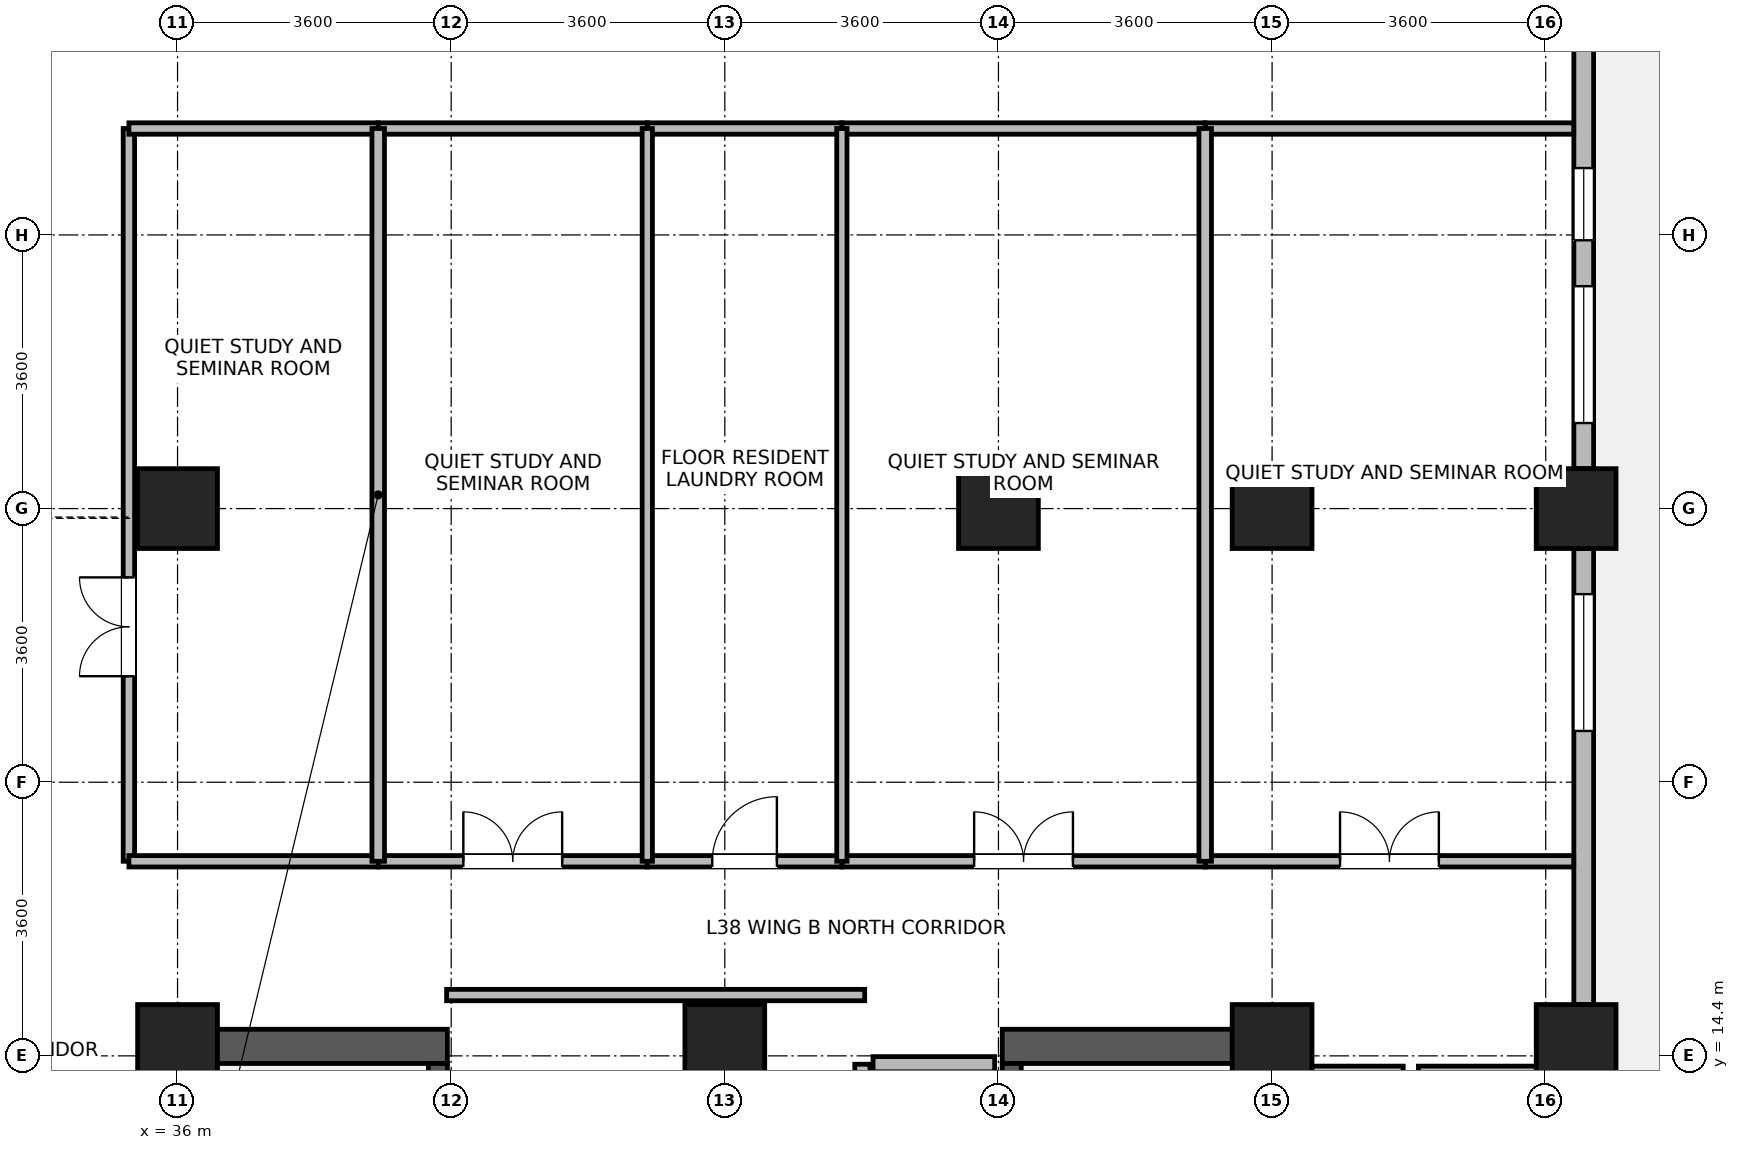
"""IFC4 building model, lengths in metres.
Left out: names, types, materials, properties, quantities, classifications, styles, units other than length and angle.
Written with IfcOpenShell. Run it as: python <this file> out.ifc"""

import sys

from ifc_helpers import new_model, si_unit, direction, frame, frame_2d, origin, origin_2d, place, context, subcontext, project, spatial, rectangle, extrude, source, transform, mapped, element, fill, save


model = new_model("IFC4")
c1 = context("Model", 3, precision=1e-05, world=origin(), true_north=direction((0.0, 1.0)))
c2 = subcontext(c1, "Body", "Model", "MODEL_VIEW")
j1 = project(units=[si_unit("LENGTHUNIT", "METRE"), si_unit("PLANEANGLEUNIT", "RADIAN")], contexts=[c1])
p1 = place(None, origin())
s1 = spatial("IfcSite", under=j1, at=p1, CompositionType="ELEMENT")
p2 = place(p1, origin())
s2 = spatial("IfcBuilding", under=s1, at=p2, CompositionType="ELEMENT")
p3 = place(p2, frame((0.0, 0.0, 151.3)))
s3 = spatial("IfcBuildingStorey", under=s2, at=p3, CompositionType="ELEMENT", Elevation=151.3)
for number, where, z_axis, x_axis in (
    (1, (36.125, 6.85, 0.0), (0.0, 0.0, 1.0), (0.0, 1.0, 0.0)),
    (2, (50.275, 6.85, 0.0), (0.0, 0.0, 1.0), (0.0, 1.0, 0.0)),
):
    element("IfcWall", number, at=place(p3, frame(where, z_axis=z_axis, x_axis=x_axis)), inside=s3, PredefinedType="SHEAR", context=c2, shape_type="SweptSolid", body=[
        extrude(rectangle(XDim=7.9, YDim=0.45, at=frame_2d((3.95, 0.0))), origin(), (0.0, 0.0, 1.0), 3.46),
    ])
for number, where, z_axis, x_axis in (
    (3, (36.35, 14.525, 0.0), (0.0, 0.0, 1.0), (1.0, 0.0, 0.0)),
    (4, (46.85, 14.525, 0.0), (0.0, 0.0, 1.0), (1.0, 0.0, 0.0)),
):
    element("IfcWall", number, at=place(p3, frame(where, z_axis=z_axis, x_axis=x_axis)), inside=s3, PredefinedType="SHEAR", context=c2, shape_type="SweptSolid", body=[
        extrude(rectangle(XDim=3.2, YDim=0.45, at=frame_2d((1.6, 0.0))), origin(), (0.0, 0.0, 1.0), 3.46),
    ])
p4 = place(p3, frame((39.425, 7.3, 0.0), z_axis=(0.0, 0.0, 1.0), x_axis=(0.0, 1.0, 0.0)))
e5 = element("IfcWall", 5, at=p4, inside=s3, PredefinedType="SHEAR", context=c2, shape_type="SweptSolid", body=[
    extrude(rectangle(XDim=7.0, YDim=0.25, at=frame_2d((3.5, 0.0))), origin(), (0.0, 0.0, 1.0), 3.46),
])
p5 = place(p4, frame((0.15, 0.0, 0.0)))
e6 = element("IfcOpeningElement", 6, at=p5, cuts=e5, PredefinedType="OPENING", context=c2, shape_type="SweptSolid", body=[
    extrude(rectangle(XDim=1.1, YDim=2.08, at=frame_2d((0.55, 1.04))), frame((0.0, 0.135, 0.0), z_axis=(0.0, -1.0, 0.0), x_axis=(1.0, 0.0, 0.0)), (0.0, 0.0, 1.0), 0.27),
])
p6 = place(p3, frame((46.975, 7.3, 0.0), z_axis=(0.0, 0.0, 1.0), x_axis=(0.0, 1.0, 0.0)))
e7 = element("IfcWall", 7, at=p6, inside=s3, PredefinedType="SHEAR", context=c2, shape_type="SweptSolid", body=[
    extrude(rectangle(XDim=7.0, YDim=0.25, at=frame_2d((3.5, 0.0))), origin(), (0.0, 0.0, 1.0), 3.46),
])
p7 = place(p6, frame((0.15, 0.0, 0.0)))
e8 = element("IfcOpeningElement", 8, at=p7, cuts=e7, PredefinedType="OPENING", context=c2, shape_type="SweptSolid", body=[
    extrude(rectangle(XDim=1.1, YDim=2.08, at=frame_2d((0.55, 1.04))), frame((0.0, 0.135, 0.0), z_axis=(0.0, -1.0, 0.0), x_axis=(1.0, 0.0, 0.0)), (0.0, 0.0, 1.0), 0.27),
])
m1 = source(origin(), c2, "Body", "SweptSolid", [
    extrude(rectangle(XDim=1.05, YDim=1.05, at=origin_2d()), origin(), (0.0, 0.0, 1.0), 3.7),
])
for number, where, z_axis, x_axis in (
    (9, (36.0, 21.6, 0.0), (0.0, 0.0, 1.0), (1.0, 0.0, 0.0)),
    (10, (46.8, 21.6, 0.0), (0.0, 0.0, 1.0), (1.0, 0.0, 0.0)),
    (11, (36.0, 14.55, 0.0), (0.0, 0.0, 1.0), (1.0, 0.0, 0.0)),
    (12, (43.2, 14.55, 0.0), (0.0, 0.0, 1.0), (1.0, 0.0, 0.0)),
    (13, (50.4, 14.55, 0.0), (0.0, 0.0, 1.0), (1.0, 0.0, 0.0)),
    (14, (50.4, 21.6, 0.0), (0.0, 0.0, 1.0), (1.0, 0.0, 0.0)),
    (15, (54.4, 14.55, 0.0), (0.0, 0.0, 1.0), (1.0, 0.0, 0.0)),
    (16, (54.4, 21.6, 0.0), (0.0, 0.0, 1.0), (1.0, 0.0, 0.0)),
):
    element("IfcColumn", number, at=place(p3, frame(where, z_axis=z_axis, x_axis=x_axis)), inside=s3, PredefinedType="COLUMN", context=c2, shape_type="MappedRepresentation", body=[
        mapped(m1, transform((0.0, 0.0, 0.0), x_axis=(1.0, 0.0, 0.0), y_axis=(0.0, 1.0, 0.0), z_axis=(0.0, 0.0, 1.0), scale=1.0)),
    ])
p8 = place(p3, frame((54.5, 21.074, 0.0), z_axis=(0.0, 0.0, 1.0), x_axis=(0.0, -1.0, 0.0)))
e17 = element("IfcWall", 17, at=p8, inside=s3, PredefinedType="STANDARD", context=c2, shape_type="SweptSolid", body=[
    extrude(rectangle(XDim=5.998, YDim=0.26, at=frame_2d((2.999, 0.0))), origin(), (0.0, 0.0, 1.0), 2.99),
])
p9 = place(p8, frame((0.6, 0.0, 0.85)))
e18 = element("IfcOpeningElement", 18, at=p9, cuts=e17, PredefinedType="OPENING", context=c2, shape_type="SweptSolid", body=[
    extrude(rectangle(XDim=1.8, YDim=1.85, at=frame_2d((0.9, 0.925))), frame((0.0, 0.14, 0.0), z_axis=(0.0, -1.0, 0.0), x_axis=(1.0, 0.0, 0.0)), (0.0, 0.0, 1.0), 0.28),
])
p10 = place(p3, frame((54.5, 28.124, 0.0), z_axis=(0.0, 0.0, 1.0), x_axis=(0.0, -1.0, 0.0)))
e19 = element("IfcWall", 19, at=p10, inside=s3, PredefinedType="STANDARD", context=c2, shape_type="SweptSolid", body=[
    extrude(rectangle(XDim=5.998, YDim=0.26, at=frame_2d((2.999, 0.0))), origin(), (0.0, 0.0, 1.0), 2.99),
])
p11 = place(p10, frame((3.598, 0.0, 0.85)))
e20 = element("IfcOpeningElement", 20, at=p11, cuts=e19, PredefinedType="OPENING", context=c2, shape_type="SweptSolid", body=[
    extrude(rectangle(XDim=1.8, YDim=1.85, at=frame_2d((0.9, 0.925))), frame((0.0, 0.14, 0.0), z_axis=(0.0, -1.0, 0.0), x_axis=(1.0, 0.0, 0.0)), (0.0, 0.0, 1.0), 0.28),
])
p12 = place(p10, frame((2.044, 0.0, 0.85)))
e21 = element("IfcOpeningElement", 21, at=p12, cuts=e19, PredefinedType="OPENING", context=c2, shape_type="SweptSolid", body=[
    extrude(rectangle(XDim=0.95, YDim=1.75, at=frame_2d((0.475, 0.875))), frame((0.0, 0.14, 0.0), z_axis=(0.0, -1.0, 0.0), x_axis=(1.0, 0.0, 0.0)), (0.0, 0.0, 1.0), 0.28),
])
p13 = place(p3, frame((50.475, 14.165, 0.0), z_axis=(0.0, 0.0, 1.0), x_axis=(1.0, 0.0, 0.0)))
e22 = element("IfcWall", 22, at=p13, inside=s3, PredefinedType="PARTITIONING", context=c2, shape_type="SweptSolid", body=[
    extrude(rectangle(XDim=1.65, YDim=0.2, at=frame_2d((0.825, 0.0))), origin(), (0.0, 0.0, 1.0), 3.44),
])
p14 = place(p3, frame((52.325, 14.165, 0.0), z_axis=(0.0, 0.0, 1.0), x_axis=(1.0, 0.0, 0.0)))
e23 = element("IfcWall", 23, at=p14, inside=s3, PredefinedType="PARTITIONING", context=c2, shape_type="SweptSolid", body=[
    extrude(rectangle(XDim=1.65, YDim=0.2, at=frame_2d((0.825, 0.0))), origin(), (0.0, 0.0, 1.0), 3.44),
])
p15 = place(p3, frame((45.15, 14.29, 0.0), z_axis=(0.0, 0.0, 1.0), x_axis=(1.0, 0.0, 0.0)))
e24 = element("IfcWall", 24, at=p15, inside=s3, PredefinedType="PARTITIONING", context=c2, shape_type="SweptSolid", body=[
    extrude(rectangle(XDim=1.6, YDim=0.2, at=frame_2d((0.8, 0.0))), origin(), (0.0, 0.0, 1.0), 2.44),
])
p16 = place(p3, frame((45.01, 11.61, 0.0), z_axis=(0.0, 0.0, 1.0), x_axis=(0.0, 1.0, 0.0)))
e25 = element("IfcWall", 25, at=p16, inside=s3, PredefinedType="PARTITIONING", context=c2, shape_type="SweptSolid", body=[
    extrude(rectangle(XDim=2.68, YDim=0.2, at=frame_2d((1.34, 0.0))), origin(), (0.0, 0.0, 1.0), 3.44),
])
p17 = place(p3, frame((35.36, 16.96, 0.0), z_axis=(0.0, 0.0, 1.0), x_axis=(0.0, 1.0, 0.0)))
e26 = element("IfcWall", 26, at=p17, inside=s3, PredefinedType="PARTITIONING", context=c2, shape_type="SweptSolid", body=[
    extrude(rectangle(XDim=9.64, YDim=0.15, at=frame_2d((4.82, 0.0))), origin(), (0.0, 0.0, 1.0), 3.44),
])
p18 = place(p17, frame((2.435, 0.0, 0.0)))
e27 = element("IfcOpeningElement", 27, at=p18, cuts=e26, PredefinedType="OPENING", context=c2, shape_type="SweptSolid", body=[
    extrude(rectangle(XDim=1.3, YDim=2.12, at=frame_2d((0.65, 1.06))), frame((0.0, 0.085, 0.0), z_axis=(0.0, -1.0, 0.0), x_axis=(1.0, 0.0, 0.0)), (0.0, 0.0, 1.0), 0.17),
])
p19 = place(p3, frame((39.54, 15.2, 0.0), z_axis=(0.0, 0.0, 1.0), x_axis=(1.0, 0.0, 0.0)))
e28 = element("IfcWall", 28, at=p19, inside=s3, PredefinedType="PARTITIONING", context=c2, shape_type="SweptSolid", body=[
    extrude(rectangle(XDim=5.5, YDim=0.15, at=frame_2d((2.75, 0.0))), origin(), (0.0, 0.0, 1.0), 3.44),
])
p20 = place(p3, frame((49.52, 16.96, 0.0), z_axis=(0.0, 0.0, 1.0), x_axis=(1.0, 0.0, 0.0)))
e29 = element("IfcWall", 29, at=p20, inside=s3, PredefinedType="PARTITIONING", context=c2, shape_type="SweptSolid", body=[
    extrude(rectangle(XDim=4.848, YDim=0.15, at=frame_2d((2.424, 0.0))), origin(), (0.0, 0.0, 1.0), 3.44),
])
p21 = place(p20, frame((1.774, 0.0, 0.0)))
e30 = element("IfcOpeningElement", 30, at=p21, cuts=e29, PredefinedType="OPENING", context=c2, shape_type="SweptSolid", body=[
    extrude(rectangle(XDim=1.3, YDim=2.12, at=frame_2d((0.65, 1.06))), frame((0.0, 0.085, 0.0), z_axis=(0.0, -1.0, 0.0), x_axis=(1.0, 0.0, 0.0)), (0.0, 0.0, 1.0), 0.17),
])
p22 = place(p3, frame((49.52, 26.6, 0.0), z_axis=(0.0, 0.0, 1.0), x_axis=(1.0, 0.0, 0.0)))
e31 = element("IfcWall", 31, at=p22, inside=s3, PredefinedType="PARTITIONING", context=c2, shape_type="SweptSolid", body=[
    extrude(rectangle(XDim=4.848, YDim=0.15, at=frame_2d((2.424, 0.0))), origin(), (0.0, 0.0, 1.0), 3.44),
])
p23 = place(p3, frame((44.74, 16.96, 0.0), z_axis=(0.0, 0.0, 1.0), x_axis=(1.0, 0.0, 0.0)))
e32 = element("IfcWall", 32, at=p23, inside=s3, PredefinedType="PARTITIONING", context=c2, shape_type="SweptSolid", body=[
    extrude(rectangle(XDim=4.78, YDim=0.15, at=frame_2d((2.39, 0.0))), origin(), (0.0, 0.0, 1.0), 3.44),
])
p24 = place(p23, frame((1.74, 0.0, 0.0)))
e33 = element("IfcOpeningElement", 33, at=p24, cuts=e32, PredefinedType="OPENING", context=c2, shape_type="SweptSolid", body=[
    extrude(rectangle(XDim=1.3, YDim=2.12, at=frame_2d((0.65, 1.06))), frame((0.0, 0.085, 0.0), z_axis=(0.0, -1.0, 0.0), x_axis=(1.0, 0.0, 0.0)), (0.0, 0.0, 1.0), 0.17),
])
p25 = place(p3, frame((44.74, 26.6, 0.0), z_axis=(0.0, 0.0, 1.0), x_axis=(1.0, 0.0, 0.0)))
e34 = element("IfcWall", 34, at=p25, inside=s3, PredefinedType="PARTITIONING", context=c2, shape_type="SweptSolid", body=[
    extrude(rectangle(XDim=4.78, YDim=0.15, at=frame_2d((2.39, 0.0))), origin(), (0.0, 0.0, 1.0), 3.44),
])
p26 = place(p3, frame((38.64, 16.96, 0.0), z_axis=(0.0, 0.0, 1.0), x_axis=(1.0, 0.0, 0.0)))
e35 = element("IfcWall", 35, at=p26, inside=s3, PredefinedType="PARTITIONING", context=c2, shape_type="SweptSolid", body=[
    extrude(rectangle(XDim=3.54, YDim=0.15, at=frame_2d((1.77, 0.0))), origin(), (0.0, 0.0, 1.0), 3.44),
])
p27 = place(p26, frame((1.12, 0.0, 0.0)))
e36 = element("IfcOpeningElement", 36, at=p27, cuts=e35, PredefinedType="OPENING", context=c2, shape_type="SweptSolid", body=[
    extrude(rectangle(XDim=1.3, YDim=2.12, at=frame_2d((0.65, 1.06))), frame((0.0, 0.085, 0.0), z_axis=(0.0, -1.0, 0.0), x_axis=(1.0, 0.0, 0.0)), (0.0, 0.0, 1.0), 0.17),
])
p28 = place(p3, frame((38.64, 26.6, 0.0), z_axis=(0.0, 0.0, 1.0), x_axis=(1.0, 0.0, 0.0)))
e37 = element("IfcWall", 37, at=p28, inside=s3, PredefinedType="PARTITIONING", context=c2, shape_type="SweptSolid", body=[
    extrude(rectangle(XDim=3.54, YDim=0.15, at=frame_2d((1.77, 0.0))), origin(), (0.0, 0.0, 1.0), 3.44),
])
for number, where, z_axis, x_axis in (
    (38, (35.36, 16.96, 0.0), (0.0, 0.0, 1.0), (1.0, 0.0, 0.0)),
    (39, (35.36, 26.6, 0.0), (0.0, 0.0, 1.0), (1.0, 0.0, 0.0)),
):
    element("IfcWall", number, at=place(p3, frame(where, z_axis=z_axis, x_axis=x_axis)), inside=s3, PredefinedType="PARTITIONING", context=c2, shape_type="SweptSolid", body=[
        extrude(rectangle(XDim=3.28, YDim=0.15, at=frame_2d((1.64, 0.0))), origin(), (0.0, 0.0, 1.0), 3.44),
    ])
p29 = place(p3, frame((42.18, 16.96, 0.0), z_axis=(0.0, 0.0, 1.0), x_axis=(1.0, 0.0, 0.0)))
e40 = element("IfcWall", 40, at=p29, inside=s3, PredefinedType="PARTITIONING", context=c2, shape_type="SweptSolid", body=[
    extrude(rectangle(XDim=2.56, YDim=0.15, at=frame_2d((1.28, 0.0))), origin(), (0.0, 0.0, 1.0), 3.44),
])
p30 = place(p29, frame((0.855, 0.0, 0.0)))
e41 = element("IfcOpeningElement", 41, at=p30, cuts=e40, PredefinedType="OPENING", context=c2, shape_type="SweptSolid", body=[
    extrude(rectangle(XDim=0.85, YDim=2.04, at=frame_2d((0.425, 1.02))), frame((0.0, 0.085, 0.0), z_axis=(0.0, -1.0, 0.0), x_axis=(1.0, 0.0, 0.0)), (0.0, 0.0, 1.0), 0.17),
])
p31 = place(p3, frame((42.18, 26.6, 0.0), z_axis=(0.0, 0.0, 1.0), x_axis=(1.0, 0.0, 0.0)))
e42 = element("IfcWall", 42, at=p31, inside=s3, PredefinedType="PARTITIONING", context=c2, shape_type="SweptSolid", body=[
    extrude(rectangle(XDim=2.56, YDim=0.15, at=frame_2d((1.28, 0.0))), origin(), (0.0, 0.0, 1.0), 3.44),
])
p32 = place(p3, frame((38.64, 16.96, 0.0), z_axis=(0.0, 0.0, 1.0), x_axis=(0.0, 1.0, 0.0)))
e43 = element("IfcWall", 43, at=p32, inside=s3, PredefinedType="PARTITIONING", context=c2, shape_type="SweptSolid", body=[
    extrude(rectangle(XDim=9.64, YDim=0.165, at=frame_2d((4.82, 0.0))), origin(), (0.0, 0.0, 1.0), 3.44),
])
for number, where, z_axis, x_axis in (
    (44, (42.18, 16.96, 0.0), (0.0, 0.0, 1.0), (0.0, 1.0, 0.0)),
    (45, (44.74, 16.96, 0.0), (0.0, 0.0, 1.0), (0.0, 1.0, 0.0)),
):
    element("IfcWall", number, at=place(p3, frame(where, z_axis=z_axis, x_axis=x_axis)), inside=s3, PredefinedType="PARTITIONING", context=c2, shape_type="SweptSolid", body=[
        extrude(rectangle(XDim=9.64, YDim=0.135, at=frame_2d((4.82, 0.0))), origin(), (0.0, 0.0, 1.0), 3.44),
    ])
p33 = place(p3, frame((49.52, 16.96, 0.0), z_axis=(0.0, 0.0, 1.0), x_axis=(0.0, 1.0, 0.0)))
e46 = element("IfcWall", 46, at=p33, inside=s3, PredefinedType="PARTITIONING", context=c2, shape_type="SweptSolid", body=[
    extrude(rectangle(XDim=9.64, YDim=0.165, at=frame_2d((4.82, 0.0))), origin(), (0.0, 0.0, 1.0), 3.44),
])
p34 = place(p9, origin())
e47 = element("IfcWindow", 47, at=p34, inside=s3, PartitioningType="SINGLE_PANEL", PredefinedType="WINDOW", context=c2, shape_type="SweptSolid", body=[
    extrude(rectangle(XDim=1.8, YDim=1.85, at=frame_2d((0.9, 0.925))), frame((0.0, 0.03, 0.0), z_axis=(0.0, -1.0, 0.0), x_axis=(1.0, 0.0, 0.0)), (0.0, 0.0, 1.0), 0.06),
])
fill(e18, e47)
p35 = place(p11, origin())
e48 = element("IfcWindow", 48, at=p35, inside=s3, PartitioningType="SINGLE_PANEL", PredefinedType="WINDOW", context=c2, shape_type="SweptSolid", body=[
    extrude(rectangle(XDim=1.8, YDim=1.85, at=frame_2d((0.9, 0.925))), frame((0.0, 0.03, 0.0), z_axis=(0.0, -1.0, 0.0), x_axis=(1.0, 0.0, 0.0)), (0.0, 0.0, 1.0), 0.06),
])
fill(e20, e48)
p36 = place(p12, origin())
e49 = element("IfcWindow", 49, at=p36, inside=s3, PartitioningType="SINGLE_PANEL", PredefinedType="WINDOW", context=c2, shape_type="SweptSolid", body=[
    extrude(rectangle(XDim=0.95, YDim=1.75, at=frame_2d((0.475, 0.875))), frame((0.0, 0.03, 0.0), z_axis=(0.0, -1.0, 0.0), x_axis=(1.0, 0.0, 0.0)), (0.0, 0.0, 1.0), 0.06),
])
fill(e21, e49)
p37 = place(p18, origin())
e50 = element("IfcDoor", 50, at=p37, inside=s3, OperationType="DOUBLE_DOOR_SINGLE_SWING", PredefinedType="DOOR", context=c2, shape_type="SweptSolid", body=[
    extrude(rectangle(XDim=1.3, YDim=2.12, at=frame_2d((0.65, 1.06))), frame((0.0, 0.025, 0.0), z_axis=(0.0, -1.0, 0.0), x_axis=(1.0, 0.0, 0.0)), (0.0, 0.0, 1.0), 0.05),
])
fill(e27, e50)
p38 = place(p21, origin())
e51 = element("IfcDoor", 51, at=p38, inside=s3, OperationType="DOUBLE_DOOR_SINGLE_SWING", PredefinedType="DOOR", context=c2, shape_type="SweptSolid", body=[
    extrude(rectangle(XDim=1.3, YDim=2.12, at=frame_2d((0.65, 1.06))), frame((0.0, 0.025, 0.0), z_axis=(0.0, -1.0, 0.0), x_axis=(1.0, 0.0, 0.0)), (0.0, 0.0, 1.0), 0.05),
])
fill(e30, e51)
p39 = place(p24, origin())
e52 = element("IfcDoor", 52, at=p39, inside=s3, OperationType="DOUBLE_DOOR_SINGLE_SWING", PredefinedType="DOOR", context=c2, shape_type="SweptSolid", body=[
    extrude(rectangle(XDim=1.3, YDim=2.12, at=frame_2d((0.65, 1.06))), frame((0.0, 0.025, 0.0), z_axis=(0.0, -1.0, 0.0), x_axis=(1.0, 0.0, 0.0)), (0.0, 0.0, 1.0), 0.05),
])
fill(e33, e52)
p40 = place(p27, origin())
e53 = element("IfcDoor", 53, at=p40, inside=s3, OperationType="DOUBLE_DOOR_SINGLE_SWING", PredefinedType="DOOR", context=c2, shape_type="SweptSolid", body=[
    extrude(rectangle(XDim=1.3, YDim=2.12, at=frame_2d((0.65, 1.06))), frame((0.0, 0.025, 0.0), z_axis=(0.0, -1.0, 0.0), x_axis=(1.0, 0.0, 0.0)), (0.0, 0.0, 1.0), 0.05),
])
fill(e36, e53)
p41 = place(p30, origin())
e54 = element("IfcDoor", 54, at=p41, inside=s3, OperationType="SINGLE_SWING_RIGHT", PredefinedType="DOOR", context=c2, shape_type="SweptSolid", body=[
    extrude(rectangle(XDim=0.85, YDim=2.04, at=frame_2d((0.425, 1.02))), frame((0.0, 0.025, 0.0), z_axis=(0.0, -1.0, 0.0), x_axis=(1.0, 0.0, 0.0)), (0.0, 0.0, 1.0), 0.05),
])
fill(e41, e54)
save(model, sys.argv[1])
